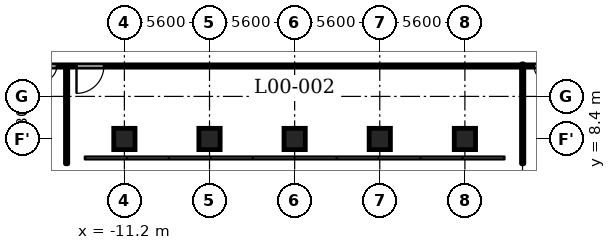
"""IFC4 building model, lengths in metres.
Left out: names, types, materials, properties, quantities, classifications, styles, units other than length and angle.
Written with IfcOpenShell. Run it as: python <this file> out.ifc"""

import sys

from ifc_helpers import new_model, si_unit, direction, frame, frame_2d, origin, origin_2d, place, context, subcontext, project, spatial, polyline, rectangle, outline, extrude, element, fill, save


model = new_model("IFC4")
c1 = context("Model", 3, precision=1e-05, world=origin(), true_north=direction((0.0, 1.0)))
c2 = subcontext(c1, "Body", "Model", "MODEL_VIEW")
j1 = project(units=[si_unit("LENGTHUNIT", "METRE"), si_unit("PLANEANGLEUNIT", "RADIAN")], contexts=[c1])
p1 = place(None, origin())
s1 = spatial("IfcSite", under=j1, at=p1, CompositionType="ELEMENT")
p2 = place(p1, origin())
s2 = spatial("IfcBuilding", under=s1, at=p2, CompositionType="ELEMENT")
p3 = place(p2, origin())
s3 = spatial("IfcBuildingStorey", under=s2, at=p3, CompositionType="ELEMENT", Elevation=0.0)
for number, where, z_axis, x_axis in (
    (1, (-11.2, 8.4, 0.0), (0.0, 0.0, 1.0), (1.0, 0.0, 0.0)),
    (2, (-5.6, 8.4, 0.0), (0.0, 0.0, 1.0), (1.0, 0.0, 0.0)),
    (3, (0.0, 8.4, 0.0), (0.0, 0.0, 1.0), (1.0, 0.0, 0.0)),
    (4, (5.6, 8.4, 0.0), (0.0, 0.0, 1.0), (1.0, 0.0, 0.0)),
    (5, (11.2, 8.4, 0.0), (0.0, 0.0, 1.0), (1.0, 0.0, 0.0)),
):
    element("IfcColumn", number, at=place(p3, frame(where, z_axis=z_axis, x_axis=x_axis)), inside=s3, PredefinedType="COLUMN", context=c2, shape_type="SweptSolid", body=[
        extrude(rectangle(XDim=1.4, YDim=1.4, at=origin_2d()), origin(), (0.0, 0.0, 1.0), 6.5),
    ])
p4 = place(p3, frame((-17.4, 13.2, 0.0), z_axis=(0.0, 0.0, 1.0), x_axis=(1.0, 0.0, 0.0)))
e6 = element("IfcWall", 6, at=p4, inside=s3, PredefinedType="PARTITIONING", context=c2, shape_type="SweptSolid", body=[
    extrude(rectangle(XDim=34.8, YDim=0.15, at=frame_2d((17.4, 0.0))), origin(), (0.0, 0.0, 1.0), 6.15),
])
p5 = place(p4, frame((3.05, 0.0, 0.0)))
e7 = element("IfcOpeningElement", 7, at=p5, cuts=e6, PredefinedType="OPENING", context=c2, shape_type="SweptSolid", body=[
    extrude(rectangle(XDim=1.8, YDim=2.1, at=frame_2d((0.9, 1.05))), frame((0.0, 0.085, 0.0), z_axis=(0.0, -1.0, 0.0), x_axis=(1.0, 0.0, 0.0)), (0.0, 0.0, 1.0), 0.17),
])
p6 = place(p4, frame((0.75, 0.0, 0.0)))
e8 = element("IfcOpeningElement", 8, at=p6, cuts=e6, PredefinedType="OPENING", context=c2, shape_type="SweptSolid", body=[
    extrude(rectangle(XDim=1.0, YDim=2.1, at=frame_2d((0.5, 1.05))), frame((0.0, 0.085, 0.0), z_axis=(0.0, -1.0, 0.0), x_axis=(1.0, 0.0, 0.0)), (0.0, 0.0, 1.0), 0.17),
])
p7 = place(p4, frame((33.15, 0.0, 0.0)))
e9 = element("IfcOpeningElement", 9, at=p7, cuts=e6, PredefinedType="OPENING", context=c2, shape_type="SweptSolid", body=[
    extrude(rectangle(XDim=1.0, YDim=2.1, at=frame_2d((0.5, 1.05))), frame((0.0, 0.085, 0.0), z_axis=(0.0, -1.0, 0.0), x_axis=(1.0, 0.0, 0.0)), (0.0, 0.0, 1.0), 0.17),
])
for number, where, z_axis, x_axis in (
    (10, (-15.0, 6.769, 0.0), (0.0, 0.0, 1.0), (0.0, 1.0, 0.0)),
    (11, (15.0, 6.769, 0.0), (0.0, 0.0, 1.0), (0.0, 1.0, 0.0)),
):
    element("IfcWall", number, at=place(p3, frame(where, z_axis=z_axis, x_axis=x_axis)), inside=s3, PredefinedType="PARTITIONING", context=c2, shape_type="SweptSolid", body=[
        extrude(rectangle(XDim=6.356, YDim=0.15, at=frame_2d((3.178, 0.0))), origin(), (0.0, 0.0, 1.0), 6.15),
    ])
p8 = place(p3, origin())
e12 = element("IfcWall", 12, at=p8, inside=s3, PredefinedType="SOLIDWALL", context=c2, shape_type="SweptSolid", body=[
    extrude(outline(polyline([(-13.849, 7.3), (-14.937, 6.937), (-15.3, 5.849), (-15.3, 5.8), (-15.0, 5.8), (-14.7, 6.7), (-13.8, 7.0), (-13.8, 7.3), (-13.849, 7.3)])), origin(), (0.0, 0.0, 1.0), 6.15),
])
e13 = element("IfcWall", 13, at=p8, inside=s3, PredefinedType="SOLIDWALL", context=c2, shape_type="SweptSolid", body=[
    extrude(outline(polyline([(14.937, 6.937), (13.849, 7.3), (13.8, 7.3), (13.8, 7.0), (14.7, 6.7), (15.0, 5.8), (15.3, 5.8), (15.3, 5.849), (14.937, 6.937)])), origin(), (0.0, 0.0, 1.0), 6.15),
])
p9 = place(p5, origin())
e14 = element("IfcDoor", 14, at=p9, inside=s3, OperationType="SINGLE_SWING_LEFT", PredefinedType="DOOR", context=c2, shape_type="SweptSolid", body=[
    extrude(rectangle(XDim=1.8, YDim=2.1, at=frame_2d((0.9, 1.05))), frame((0.0, 0.025, 0.0), z_axis=(0.0, -1.0, 0.0), x_axis=(1.0, 0.0, 0.0)), (0.0, 0.0, 1.0), 0.05),
])
fill(e7, e14)
p10 = place(p6, origin())
e15 = element("IfcDoor", 15, at=p10, inside=s3, OperationType="SINGLE_SWING_LEFT", PredefinedType="DOOR", context=c2, shape_type="SweptSolid", body=[
    extrude(rectangle(XDim=1.0, YDim=2.1, at=frame_2d((0.5, 1.05))), frame((0.0, 0.025, 0.0), z_axis=(0.0, -1.0, 0.0), x_axis=(1.0, 0.0, 0.0)), (0.0, 0.0, 1.0), 0.05),
])
fill(e8, e15)
p11 = place(p7, origin())
e16 = element("IfcDoor", 16, at=p11, inside=s3, OperationType="SINGLE_SWING_RIGHT", PredefinedType="DOOR", context=c2, shape_type="SweptSolid", body=[
    extrude(rectangle(XDim=1.0, YDim=2.1, at=frame_2d((0.5, 1.05))), frame((0.0, 0.025, 0.0), z_axis=(0.0, -1.0, 0.0), x_axis=(1.0, 0.0, 0.0)), (0.0, 0.0, 1.0), 0.05),
])
fill(e9, e16)
save(model, sys.argv[1])
